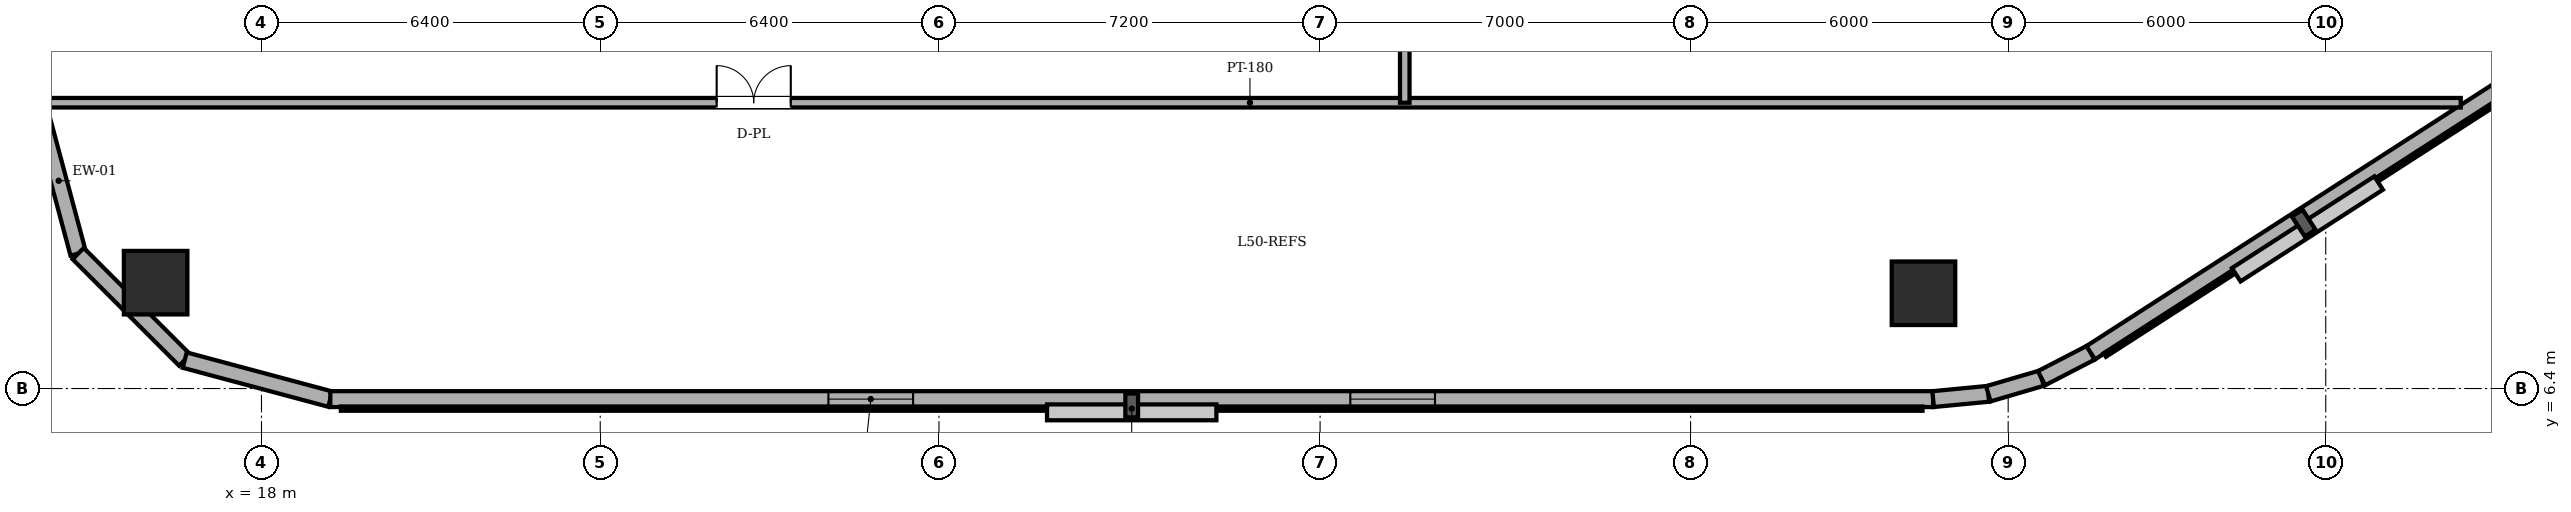
"""IFC4 building model, lengths in metres.
Left out: names, types, materials, properties, quantities, classifications, styles, units other than length and angle.
Written with IfcOpenShell. Run it as: python <this file> out.ifc"""

import sys

from ifc_helpers import new_model, si_unit, direction, frame, frame_2d, origin, origin_2d, place, context, subcontext, project, spatial, rectangle, circle, extrude, element, fill, save


model = new_model("IFC4")
c1 = context("Model", 3, precision=1e-05, world=origin(), true_north=direction((0.0, 1.0)))
c2 = subcontext(c1, "Body", "Model", "MODEL_VIEW")
j1 = project(units=[si_unit("LENGTHUNIT", "METRE"), si_unit("PLANEANGLEUNIT", "RADIAN")], contexts=[c1])
p1 = place(None, origin())
s1 = spatial("IfcSite", under=j1, at=p1, CompositionType="ELEMENT")
p2 = place(p1, origin())
s2 = spatial("IfcBuilding", under=s1, at=p2, CompositionType="ELEMENT")
p3 = place(p2, frame((0.0, 0.0, 190.6)))
s3 = spatial("IfcBuildingStorey", under=s2, at=p3, CompositionType="ELEMENT", Elevation=190.6)
for number, where, z_axis, x_axis in (
    (1, (16.0, 8.4, 0.0), (0.0, 0.0, 1.0), (1.0, 0.0, 0.0)),
    (2, (49.4, 8.2, 0.0), (0.0, 0.0, 1.0), (1.0, 0.0, 0.0)),
):
    element("IfcColumn", number, at=place(p3, frame(where, z_axis=z_axis, x_axis=x_axis)), inside=s3, PredefinedType="COLUMN", context=c2, shape_type="SweptSolid", body=[
        extrude(circle(Radius=0.6, at=origin_2d()), origin(), (0.0, 0.0, 1.0), 2.96),
    ])
p4 = place(p3, frame((13.8, 11.7, 0.0), z_axis=(0.0, 0.0, 1.0), x_axis=(0.258884674387, -0.965908238586, 0.0)))
e3 = element("IfcWall", 3, at=p4, inside=s3, PredefinedType="SOLIDWALL", context=c2, shape_type="SweptSolid", body=[
    extrude(rectangle(XDim=2.847, YDim=0.3, at=frame_2d((1.424, 0.0))), origin(), (0.0, 0.0, 1.0), 5.36),
])
p5 = place(p3, frame((14.537, 8.95, 0.0), z_axis=(0.0, 0.0, 1.0), x_axis=(0.707106781187, -0.707106781187, 0.0)))
e4 = element("IfcWall", 4, at=p5, inside=s3, PredefinedType="SOLIDWALL", context=c2, shape_type="SweptSolid", body=[
    extrude(rectangle(XDim=2.847, YDim=0.3, at=frame_2d((1.423, 0.0))), origin(), (0.0, 0.0, 1.0), 5.36),
])
p6 = place(p3, frame((16.55, 6.937, 0.0), z_axis=(0.0, 0.0, 1.0), x_axis=(0.965908238586, -0.258884674387, 0.0)))
e5 = element("IfcWall", 5, at=p6, inside=s3, PredefinedType="SOLIDWALL", context=c2, shape_type="SweptSolid", body=[
    extrude(rectangle(XDim=2.847, YDim=0.3, at=frame_2d((1.424, 0.0))), origin(), (0.0, 0.0, 1.0), 5.36),
])
p7 = place(p3, frame((19.3, 6.2, 0.0), z_axis=(0.0, 0.0, 1.0), x_axis=(1.0, 0.0, 0.0)))
e6 = element("IfcWall", 6, at=p7, inside=s3, PredefinedType="SOLIDWALL", context=c2, shape_type="SweptSolid", body=[
    extrude(rectangle(XDim=30.282, YDim=0.3, at=frame_2d((15.141, 0.0))), origin(), (0.0, 0.0, 1.0), 5.36),
])
p8 = place(p7, frame((9.411, 0.0, 0.85)))
e7 = element("IfcOpeningElement", 7, at=p8, cuts=e6, PredefinedType="OPENING", context=c2, shape_type="SweptSolid", body=[
    extrude(rectangle(XDim=1.6, YDim=1.2, at=frame_2d((0.8, 0.6))), frame((0.0, 0.16, 0.0), z_axis=(0.0, -1.0, 0.0), x_axis=(1.0, 0.0, 0.0)), (0.0, 0.0, 1.0), 0.32),
])
p9 = place(p7, frame((19.271, 0.0, 0.85)))
e8 = element("IfcOpeningElement", 8, at=p9, cuts=e6, PredefinedType="OPENING", context=c2, shape_type="SweptSolid", body=[
    extrude(rectangle(XDim=1.6, YDim=1.2, at=frame_2d((0.8, 0.6))), frame((0.0, 0.16, 0.0), z_axis=(0.0, -1.0, 0.0), x_axis=(1.0, 0.0, 0.0)), (0.0, 0.0, 1.0), 0.32),
])
p10 = place(p3, frame((49.582, 6.2, 0.0), z_axis=(0.0, 0.0, 1.0), x_axis=(0.995426089968, 0.095534807324, 0.0)))
e9 = element("IfcWall", 9, at=p10, inside=s3, PredefinedType="SOLIDWALL", context=c2, shape_type="SweptSolid", body=[
    extrude(rectangle(XDim=1.048, YDim=0.3, at=frame_2d((0.524, 0.0))), origin(), (0.0, 0.0, 1.0), 5.36),
])
p11 = place(p3, frame((50.625, 6.3, 0.0), z_axis=(0.0, 0.0, 1.0), x_axis=(0.959528674476, 0.281610942363, 0.0)))
e10 = element("IfcWall", 10, at=p11, inside=s3, PredefinedType="SOLIDWALL", context=c2, shape_type="SweptSolid", body=[
    extrude(rectangle(XDim=1.047, YDim=0.3, at=frame_2d((0.524, 0.0))), origin(), (0.0, 0.0, 1.0), 5.36),
])
p12 = place(p3, frame((51.63, 6.595, 0.0), z_axis=(0.0, 0.0, 1.0), x_axis=(0.888283247196, 0.459296062198, 0.0)))
e11 = element("IfcWall", 11, at=p12, inside=s3, PredefinedType="SOLIDWALL", context=c2, shape_type="SweptSolid", body=[
    extrude(rectangle(XDim=1.047, YDim=0.3, at=frame_2d((0.523, 0.0))), origin(), (0.0, 0.0, 1.0), 5.36),
])
p13 = place(p3, frame((52.56, 7.076, 0.0), z_axis=(0.0, 0.0, 1.0), x_axis=(0.840696388796, 0.541506769917, 0.0)))
e12 = element("IfcWall", 12, at=p13, inside=s3, PredefinedType="SOLIDWALL", context=c2, shape_type="SweptSolid", body=[
    extrude(rectangle(XDim=9.418, YDim=0.3, at=frame_2d((4.709, 0.0))), origin(), (0.0, 0.0, 1.0), 5.36),
])
p14 = place(p3, frame((13.8, 11.8, 0.0), z_axis=(0.0, 0.0, 1.0), x_axis=(1.0, 0.0, 0.0)))
e13 = element("IfcWall", 13, at=p14, inside=s3, PredefinedType="PARTITIONING", context=c2, shape_type="SweptSolid", body=[
    extrude(rectangle(XDim=45.75, YDim=0.18, at=frame_2d((22.875, 0.0))), origin(), (0.0, 0.0, 1.0), 5.36),
])
p15 = place(p14, frame((12.8, 0.0, 0.0)))
e14 = element("IfcOpeningElement", 14, at=p15, cuts=e13, PredefinedType="OPENING", context=c2, shape_type="SweptSolid", body=[
    extrude(rectangle(XDim=1.4, YDim=2.25, at=frame_2d((0.7, 1.125))), frame((0.0, 0.1, 0.0), z_axis=(0.0, -1.0, 0.0), x_axis=(1.0, 0.0, 0.0)), (0.0, 0.0, 1.0), 0.2),
])
p16 = place(p3, frame((39.6, 11.8, 0.0), z_axis=(0.0, 0.0, 1.0), x_axis=(0.0, 1.0, 0.0)))
e15 = element("IfcWall", 15, at=p16, inside=s3, PredefinedType="PARTITIONING", context=c2, shape_type="SweptSolid", body=[
    extrude(rectangle(XDim=24.4, YDim=0.18, at=frame_2d((12.2, 0.0))), origin(), (0.0, 0.0, 1.0), 5.36),
])
p17 = place(p16, frame((18.07, 0.0, 0.0)))
e16 = element("IfcOpeningElement", 16, at=p17, cuts=e15, PredefinedType="OPENING", context=c2, shape_type="SweptSolid", body=[
    extrude(rectangle(XDim=1.4, YDim=2.25, at=frame_2d((0.7, 1.125))), frame((0.0, 0.1, 0.0), z_axis=(0.0, -1.0, 0.0), x_axis=(1.0, 0.0, 0.0)), (0.0, 0.0, 1.0), 0.2),
])
p18 = place(p16, frame((5.6, 0.0, 0.0)))
e17 = element("IfcOpeningElement", 17, at=p18, cuts=e15, PredefinedType="OPENING", context=c2, shape_type="SweptSolid", body=[
    extrude(rectangle(XDim=1.4, YDim=2.25, at=frame_2d((0.7, 1.125))), frame((0.0, 0.1, 0.0), z_axis=(0.0, -1.0, 0.0), x_axis=(1.0, 0.0, 0.0)), (0.0, 0.0, 1.0), 0.2),
])
p19 = place(p16, frame((9.7, 0.0, 0.0)))
e18 = element("IfcOpeningElement", 18, at=p19, cuts=e15, PredefinedType="OPENING", context=c2, shape_type="SweptSolid", body=[
    extrude(rectangle(XDim=1.4, YDim=2.25, at=frame_2d((0.7, 1.125))), frame((0.0, 0.1, 0.0), z_axis=(0.0, -1.0, 0.0), x_axis=(1.0, 0.0, 0.0)), (0.0, 0.0, 1.0), 0.2),
])
p20 = place(p8, origin())
e19 = element("IfcWindow", 19, at=p20, inside=s3, PartitioningType="DOUBLE_PANEL_VERTICAL", PredefinedType="WINDOW", context=c2, shape_type="SweptSolid", body=[
    extrude(rectangle(XDim=1.6, YDim=1.2, at=frame_2d((0.8, 0.6))), frame((0.0, 0.03, 0.0), z_axis=(0.0, -1.0, 0.0), x_axis=(1.0, 0.0, 0.0)), (0.0, 0.0, 1.0), 0.06),
])
fill(e7, e19)
p21 = place(p9, origin())
e20 = element("IfcWindow", 20, at=p21, inside=s3, PartitioningType="DOUBLE_PANEL_VERTICAL", PredefinedType="WINDOW", context=c2, shape_type="SweptSolid", body=[
    extrude(rectangle(XDim=1.6, YDim=1.2, at=frame_2d((0.8, 0.6))), frame((0.0, 0.03, 0.0), z_axis=(0.0, -1.0, 0.0), x_axis=(1.0, 0.0, 0.0)), (0.0, 0.0, 1.0), 0.06),
])
fill(e8, e20)
p22 = place(p15, origin())
e21 = element("IfcDoor", 21, at=p22, inside=s3, OperationType="DOUBLE_DOOR_SINGLE_SWING", PredefinedType="DOOR", context=c2, shape_type="SweptSolid", body=[
    extrude(rectangle(XDim=1.4, YDim=2.25, at=frame_2d((0.7, 1.125))), frame((0.0, 0.025, 0.0), z_axis=(0.0, -1.0, 0.0), x_axis=(1.0, 0.0, 0.0)), (0.0, 0.0, 1.0), 0.05),
])
fill(e14, e21)
save(model, sys.argv[1])
